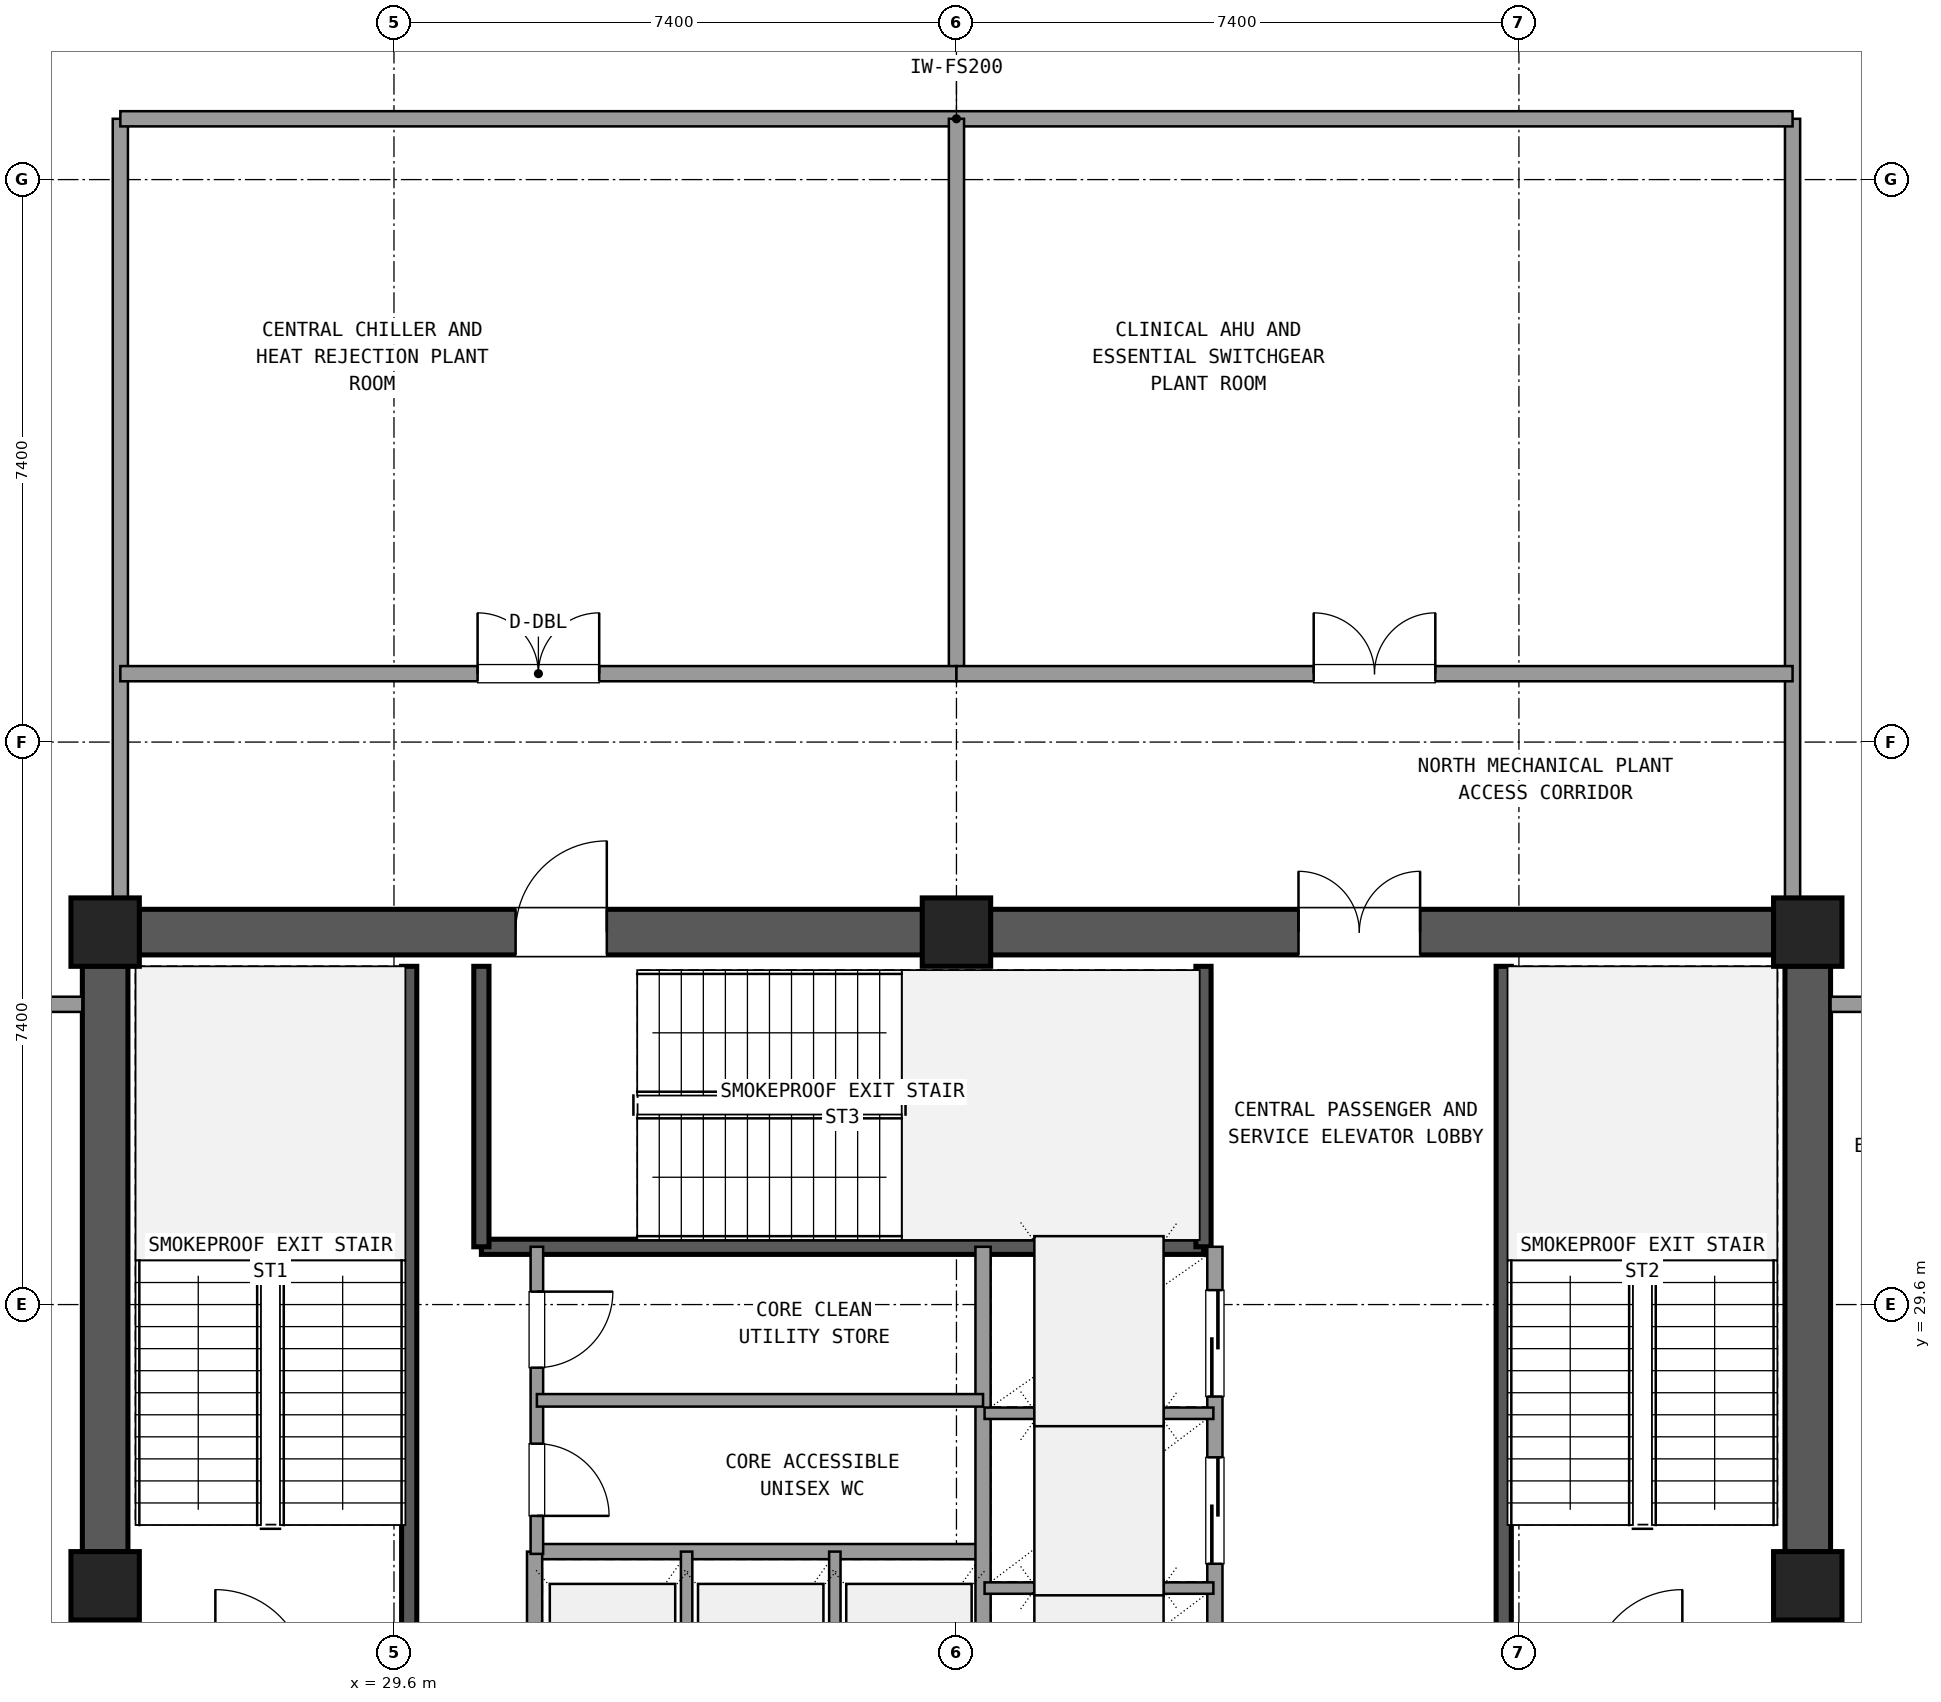
"""IFC4 building model, lengths in metres.
Left out: names, types, materials, properties, quantities, classifications, styles, units other than length and angle.
Written with IfcOpenShell. Run it as: python <this file> out.ifc"""

import sys

from ifc_helpers import new_model, si_unit, direction, frame, frame_2d, origin, origin_2d, place, context, subcontext, project, spatial, rectangle, extrude, element, fill, save


model = new_model("IFC4")
c1 = context("Model", 3, precision=1e-05, world=origin(), true_north=direction((0.0, 1.0)))
c2 = subcontext(c1, "Body", "Model", "MODEL_VIEW")
j1 = project(units=[si_unit("LENGTHUNIT", "METRE"), si_unit("PLANEANGLEUNIT", "RADIAN")], contexts=[c1])
p1 = place(None, origin())
s1 = spatial("IfcSite", under=j1, at=p1, CompositionType="ELEMENT")
p2 = place(p1, origin())
s2 = spatial("IfcBuilding", under=s1, at=p2, CompositionType="ELEMENT")
p3 = place(p2, frame((0.0, 0.0, 232.38)))
s3 = spatial("IfcBuildingStorey", under=s2, at=p3, CompositionType="ELEMENT", Elevation=232.38)
for number, where, z_axis, x_axis in (
    (1, (48.2, 25.9, 0.0), (0.0, 0.0, 1.0), (1.0, 0.0, 0.0)),
    (2, (48.2, 34.5, 0.0), (0.0, 0.0, 1.0), (1.0, 0.0, 0.0)),
    (3, (37.0, 34.5, 0.0), (0.0, 0.0, 1.0), (1.0, 0.0, 0.0)),
    (4, (25.8, 34.5, 0.0), (0.0, 0.0, 1.0), (1.0, 0.0, 0.0)),
    (5, (25.8, 25.9, 0.0), (0.0, 0.0, 1.0), (1.0, 0.0, 0.0)),
):
    element("IfcColumn", number, at=place(p3, frame(where, z_axis=z_axis, x_axis=x_axis)), inside=s3, PredefinedType="COLUMN", context=c2, shape_type="SweptSolid", body=[
        extrude(rectangle(XDim=0.9, YDim=0.9, at=origin_2d()), origin(), (0.0, 0.0, 1.0), 4.68),
    ])
p4 = place(p3, frame((48.2, 17.745, 0.0), z_axis=(0.0, 0.0, 1.0), x_axis=(0.0, 1.0, 0.0)))
e6 = element("IfcWall", 6, at=p4, inside=s3, PredefinedType="SHEAR", context=c2, shape_type="SweptSolid", body=[
    extrude(rectangle(XDim=7.71, YDim=0.6, at=frame_2d((3.855, 0.0))), origin(), (0.0, 0.0, 1.0), 4.38),
])
p5 = place(p4, frame((4.305, 0.0, 0.0)))
e7 = element("IfcOpeningElement", 7, at=p5, cuts=e6, PredefinedType="OPENING", context=c2, shape_type="SweptSolid", body=[
    extrude(rectangle(XDim=1.2, YDim=2.15, at=frame_2d((0.6, 1.075))), frame((0.0, 0.31, 0.0), z_axis=(0.0, -1.0, 0.0), x_axis=(1.0, 0.0, 0.0)), (0.0, 0.0, 1.0), 0.62),
])
p6 = place(p3, frame((48.2, 26.345, 0.0), z_axis=(0.0, 0.0, 1.0), x_axis=(0.0, 1.0, 0.0)))
e8 = element("IfcWall", 8, at=p6, inside=s3, PredefinedType="SHEAR", context=c2, shape_type="SweptSolid", body=[
    extrude(rectangle(XDim=7.71, YDim=0.6, at=frame_2d((3.855, 0.0))), origin(), (0.0, 0.0, 1.0), 4.38),
])
p7 = place(p3, frame((47.755, 34.5, 0.0), z_axis=(0.0, 0.0, 1.0), x_axis=(-1.0, 0.0, 0.0)))
e9 = element("IfcWall", 9, at=p7, inside=s3, PredefinedType="SHEAR", context=c2, shape_type="SweptSolid", body=[
    extrude(rectangle(XDim=10.31, YDim=0.6, at=frame_2d((5.155, 0.0))), origin(), (0.0, 0.0, 1.0), 4.38),
])
p8 = place(p7, frame((4.655, 0.0, 0.0)))
e10 = element("IfcOpeningElement", 10, at=p8, cuts=e9, PredefinedType="OPENING", context=c2, shape_type="SweptSolid", body=[
    extrude(rectangle(XDim=1.6, YDim=2.2, at=frame_2d((0.8, 1.1))), frame((0.0, 0.31, 0.0), z_axis=(0.0, -1.0, 0.0), x_axis=(1.0, 0.0, 0.0)), (0.0, 0.0, 1.0), 0.62),
])
p9 = place(p3, frame((36.555, 34.5, 0.0), z_axis=(0.0, 0.0, 1.0), x_axis=(-1.0, 0.0, 0.0)))
e11 = element("IfcWall", 11, at=p9, inside=s3, PredefinedType="SHEAR", context=c2, shape_type="SweptSolid", body=[
    extrude(rectangle(XDim=10.31, YDim=0.6, at=frame_2d((5.155, 0.0))), origin(), (0.0, 0.0, 1.0), 4.38),
])
p10 = place(p9, frame((4.155, 0.0, 0.0)))
e12 = element("IfcOpeningElement", 12, at=p10, cuts=e11, PredefinedType="OPENING", context=c2, shape_type="SweptSolid", body=[
    extrude(rectangle(XDim=1.2, YDim=2.15, at=frame_2d((0.6, 1.075))), frame((0.0, 0.31, 0.0), z_axis=(0.0, -1.0, 0.0), x_axis=(1.0, 0.0, 0.0)), (0.0, 0.0, 1.0), 0.62),
])
p11 = place(p3, frame((25.8, 34.055, 0.0), z_axis=(0.0, 0.0, 1.0), x_axis=(0.0, -1.0, 0.0)))
e13 = element("IfcWall", 13, at=p11, inside=s3, PredefinedType="SHEAR", context=c2, shape_type="SweptSolid", body=[
    extrude(rectangle(XDim=7.71, YDim=0.6, at=frame_2d((3.855, 0.0))), origin(), (0.0, 0.0, 1.0), 4.38),
])
p12 = place(p3, frame((25.8, 25.455, 0.0), z_axis=(0.0, 0.0, 1.0), x_axis=(0.0, -1.0, 0.0)))
e14 = element("IfcWall", 14, at=p12, inside=s3, PredefinedType="SHEAR", context=c2, shape_type="SweptSolid", body=[
    extrude(rectangle(XDim=7.71, YDim=0.6, at=frame_2d((3.855, 0.0))), origin(), (0.0, 0.0, 1.0), 4.38),
])
p13 = place(p12, frame((2.205, 0.0, 0.0)))
e15 = element("IfcOpeningElement", 15, at=p13, cuts=e14, PredefinedType="OPENING", context=c2, shape_type="SweptSolid", body=[
    extrude(rectangle(XDim=1.2, YDim=2.15, at=frame_2d((0.6, 1.075))), frame((0.0, 0.31, 0.0), z_axis=(0.0, -1.0, 0.0), x_axis=(1.0, 0.0, 0.0)), (0.0, 0.0, 1.0), 0.62),
])
for number, where, z_axis, x_axis in (
    (16, (29.8, 24.65, 0.0), (0.0, 0.0, 1.0), (0.0, 1.0, 0.0)),
    (17, (44.2, 24.65, 0.0), (0.0, 0.0, 1.0), (0.0, 1.0, 0.0)),
):
    element("IfcWall", number, at=place(p3, frame(where, z_axis=z_axis, x_axis=x_axis)), inside=s3, PredefinedType="SHEAR", context=c2, shape_type="SweptSolid", body=[
        extrude(rectangle(XDim=9.4, YDim=0.2, at=frame_2d((4.7, 0.0))), origin(), (0.0, 0.0, 1.0), 4.38),
    ])
p14 = place(p3, frame((30.75, 30.36, 0.0), z_axis=(0.0, 0.0, 1.0), x_axis=(1.0, 0.0, 0.0)))
e18 = element("IfcWall", 18, at=p14, inside=s3, PredefinedType="SHEAR", context=c2, shape_type="SweptSolid", body=[
    extrude(rectangle(XDim=9.5, YDim=0.2, at=frame_2d((4.75, 0.0))), origin(), (0.0, 0.0, 1.0), 4.38),
])
for number, where, z_axis, x_axis in (
    (19, (30.75, 30.36, 0.0), (0.0, 0.0, 1.0), (0.0, 1.0, 0.0)),
    (20, (40.25, 30.36, 0.0), (0.0, 0.0, 1.0), (0.0, 1.0, 0.0)),
):
    element("IfcWall", number, at=place(p3, frame(where, z_axis=z_axis, x_axis=x_axis)), inside=s3, PredefinedType="SHEAR", context=c2, shape_type="SweptSolid", body=[
        extrude(rectangle(XDim=3.69, YDim=0.2, at=frame_2d((1.845, 0.0))), origin(), (0.0, 0.0, 1.0), 4.38),
    ])
p15 = place(p3, frame((31.45, 26.35, 0.0), z_axis=(0.0, 0.0, 1.0), x_axis=(1.0, 0.0, 0.0)))
e21 = element("IfcWall", 21, at=p15, inside=s3, PredefinedType="SOLIDWALL", context=c2, shape_type="SweptSolid", body=[
    extrude(rectangle(XDim=5.9, YDim=0.2, at=frame_2d((2.95, 0.0))), origin(), (0.0, 0.0, 1.0), 2.75),
])
p16 = place(p3, frame((31.45, 23.54, 0.0), z_axis=(0.0, 0.0, 1.0), x_axis=(0.0, 1.0, 0.0)))
e22 = element("IfcWall", 22, at=p16, inside=s3, PredefinedType="SOLIDWALL", context=c2, shape_type="SweptSolid", body=[
    extrude(rectangle(XDim=2.81, YDim=0.2, at=frame_2d((1.405, 0.0))), origin(), (0.0, 0.0, 1.0), 2.75),
])
for number, where, z_axis, x_axis in (
    (23, (33.45, 23.54, 0.0), (0.0, 0.0, 1.0), (0.0, 1.0, 0.0)),
    (24, (35.4, 23.54, 0.0), (0.0, 0.0, 1.0), (0.0, 1.0, 0.0)),
):
    element("IfcWall", number, at=place(p3, frame(where, z_axis=z_axis, x_axis=x_axis)), inside=s3, PredefinedType="PARTITIONING", context=c2, shape_type="SweptSolid", body=[
        extrude(rectangle(XDim=2.81, YDim=0.15, at=frame_2d((1.405, 0.0))), origin(), (0.0, 0.0, 1.0), 2.75),
    ])
p17 = place(p3, frame((37.35, 23.54, 0.0), z_axis=(0.0, 0.0, 1.0), x_axis=(0.0, 1.0, 0.0)))
e25 = element("IfcWall", 25, at=p17, inside=s3, PredefinedType="SOLIDWALL", context=c2, shape_type="SweptSolid", body=[
    extrude(rectangle(XDim=6.82, YDim=0.2, at=frame_2d((3.41, 0.0))), origin(), (0.0, 0.0, 1.0), 2.75),
])
p18 = place(p3, frame((40.4, 23.54, 0.0), z_axis=(0.0, 0.0, 1.0), x_axis=(0.0, 1.0, 0.0)))
e26 = element("IfcWall", 26, at=p18, inside=s3, PredefinedType="SOLIDWALL", context=c2, shape_type="SweptSolid", body=[
    extrude(rectangle(XDim=6.82, YDim=0.2, at=frame_2d((3.41, 0.0))), origin(), (0.0, 0.0, 1.0), 2.75),
])
p19 = place(p18, frame((0.35, 0.0, 0.0)))
e27 = element("IfcOpeningElement", 27, at=p19, cuts=e26, PredefinedType="OPENING", context=c2, shape_type="SweptSolid", body=[
    extrude(rectangle(XDim=1.4, YDim=2.2, at=frame_2d((0.7, 1.1))), frame((0.0, 0.11, 0.0), z_axis=(0.0, -1.0, 0.0), x_axis=(1.0, 0.0, 0.0)), (0.0, 0.0, 1.0), 0.22),
])
p20 = place(p18, frame((2.65, 0.0, 0.0)))
e28 = element("IfcOpeningElement", 28, at=p20, cuts=e26, PredefinedType="OPENING", context=c2, shape_type="SweptSolid", body=[
    extrude(rectangle(XDim=1.4, YDim=2.2, at=frame_2d((0.7, 1.1))), frame((0.0, 0.11, 0.0), z_axis=(0.0, -1.0, 0.0), x_axis=(1.0, 0.0, 0.0)), (0.0, 0.0, 1.0), 0.22),
])
p21 = place(p18, frame((4.85, 0.0, 0.0)))
e29 = element("IfcOpeningElement", 29, at=p21, cuts=e26, PredefinedType="OPENING", context=c2, shape_type="SweptSolid", body=[
    extrude(rectangle(XDim=1.4, YDim=2.2, at=frame_2d((0.7, 1.1))), frame((0.0, 0.11, 0.0), z_axis=(0.0, -1.0, 0.0), x_axis=(1.0, 0.0, 0.0)), (0.0, 0.0, 1.0), 0.22),
])
for number, where, z_axis, x_axis in (
    (30, (37.37, 25.87, 0.0), (0.0, 0.0, 1.0), (1.0, 0.0, 0.0)),
    (31, (37.37, 28.17, 0.0), (0.0, 0.0, 1.0), (1.0, 0.0, 0.0)),
):
    element("IfcWall", number, at=place(p3, frame(where, z_axis=z_axis, x_axis=x_axis)), inside=s3, PredefinedType="PARTITIONING", context=c2, shape_type="SweptSolid", body=[
        extrude(rectangle(XDim=3.01, YDim=0.15, at=frame_2d((1.505, 0.0))), origin(), (0.0, 0.0, 1.0), 2.75),
    ])
p22 = place(p3, frame((31.48, 26.32, 0.0), z_axis=(0.0, 0.0, 1.0), x_axis=(0.0, 1.0, 0.0)))
e32 = element("IfcWall", 32, at=p22, inside=s3, PredefinedType="PLUMBINGWALL", context=c2, shape_type="SweptSolid", body=[
    extrude(rectangle(XDim=4.04, YDim=0.165, at=frame_2d((2.02, 0.0))), origin(), (0.0, 0.0, 1.0), 2.75),
])
p23 = place(p22, frame((0.5, 0.0, 0.0)))
e33 = element("IfcOpeningElement", 33, at=p23, cuts=e32, PredefinedType="OPENING", context=c2, shape_type="SweptSolid", body=[
    extrude(rectangle(XDim=0.95, YDim=2.1, at=frame_2d((0.475, 1.05))), frame((0.0, 0.093, 0.0), z_axis=(0.0, -1.0, 0.0), x_axis=(1.0, 0.0, 0.0)), (0.0, 0.0, 1.0), 0.185),
])
p24 = place(p22, frame((2.45, 0.0, 0.0)))
e34 = element("IfcOpeningElement", 34, at=p24, cuts=e32, PredefinedType="OPENING", context=c2, shape_type="SweptSolid", body=[
    extrude(rectangle(XDim=1.0, YDim=2.15, at=frame_2d((0.5, 1.075))), frame((0.0, 0.093, 0.0), z_axis=(0.0, -1.0, 0.0), x_axis=(1.0, 0.0, 0.0)), (0.0, 0.0, 1.0), 0.185),
])
p25 = place(p3, frame((31.48, 28.34, 0.0), z_axis=(0.0, 0.0, 1.0), x_axis=(1.0, 0.0, 0.0)))
e35 = element("IfcWall", 35, at=p25, inside=s3, PredefinedType="PLUMBINGWALL", context=c2, shape_type="SweptSolid", body=[
    extrude(rectangle(XDim=5.87, YDim=0.165, at=frame_2d((2.935, 0.0))), origin(), (0.0, 0.0, 1.0), 2.75),
])
for number, where, z_axis, x_axis in (
    (36, (26.0, 34.8, 0.0), (0.0, 0.0, 1.0), (0.0, 1.0, 0.0)),
    (37, (48.0, 34.8, 0.0), (0.0, 0.0, 1.0), (0.0, 1.0, 0.0)),
):
    element("IfcWall", number, at=place(p3, frame(where, z_axis=z_axis, x_axis=x_axis)), inside=s3, PredefinedType="SOLIDWALL", context=c2, shape_type="SweptSolid", body=[
        extrude(rectangle(XDim=10.4, YDim=0.2, at=frame_2d((5.2, 0.0))), origin(), (0.0, 0.0, 1.0), 2.75),
    ])
p26 = place(p3, frame((26.0, 45.2, 0.0), z_axis=(0.0, 0.0, 1.0), x_axis=(1.0, 0.0, 0.0)))
e38 = element("IfcWall", 38, at=p26, inside=s3, PredefinedType="SOLIDWALL", context=c2, shape_type="SweptSolid", body=[
    extrude(rectangle(XDim=22.0, YDim=0.2, at=frame_2d((11.0, 0.0))), origin(), (0.0, 0.0, 1.0), 2.75),
])
p27 = place(p3, frame((37.0, 37.9, 0.0), z_axis=(0.0, 0.0, 1.0), x_axis=(0.0, 1.0, 0.0)))
e39 = element("IfcWall", 39, at=p27, inside=s3, PredefinedType="SOLIDWALL", context=c2, shape_type="SweptSolid", body=[
    extrude(rectangle(XDim=7.3, YDim=0.2, at=frame_2d((3.65, 0.0))), origin(), (0.0, 0.0, 1.0), 2.75),
])
p28 = place(p3, frame((26.0, 37.9, 0.0), z_axis=(0.0, 0.0, 1.0), x_axis=(1.0, 0.0, 0.0)))
e40 = element("IfcWall", 40, at=p28, inside=s3, PredefinedType="SOLIDWALL", context=c2, shape_type="SweptSolid", body=[
    extrude(rectangle(XDim=11.0, YDim=0.2, at=frame_2d((5.5, 0.0))), origin(), (0.0, 0.0, 1.0), 2.75),
])
p29 = place(p28, frame((4.7, 0.0, 0.0)))
e41 = element("IfcOpeningElement", 41, at=p29, cuts=e40, PredefinedType="OPENING", context=c2, shape_type="SweptSolid", body=[
    extrude(rectangle(XDim=1.6, YDim=2.2, at=frame_2d((0.8, 1.1))), frame((0.0, 0.11, 0.0), z_axis=(0.0, -1.0, 0.0), x_axis=(1.0, 0.0, 0.0)), (0.0, 0.0, 1.0), 0.22),
])
p30 = place(p3, frame((37.0, 37.9, 0.0), z_axis=(0.0, 0.0, 1.0), x_axis=(1.0, 0.0, 0.0)))
e42 = element("IfcWall", 42, at=p30, inside=s3, PredefinedType="SOLIDWALL", context=c2, shape_type="SweptSolid", body=[
    extrude(rectangle(XDim=11.0, YDim=0.2, at=frame_2d((5.5, 0.0))), origin(), (0.0, 0.0, 1.0), 2.75),
])
p31 = place(p30, frame((4.7, 0.0, 0.0)))
e43 = element("IfcOpeningElement", 43, at=p31, cuts=e42, PredefinedType="OPENING", context=c2, shape_type="SweptSolid", body=[
    extrude(rectangle(XDim=1.6, YDim=2.2, at=frame_2d((0.8, 1.1))), frame((0.0, 0.11, 0.0), z_axis=(0.0, -1.0, 0.0), x_axis=(1.0, 0.0, 0.0)), (0.0, 0.0, 1.0), 0.22),
])
for number, where, z_axis, x_axis in (
    (44, (15.0, 33.55, 0.0), (0.0, 0.0, 1.0), (1.0, 0.0, 0.0)),
    (45, (48.5, 33.55, 0.0), (0.0, 0.0, 1.0), (1.0, 0.0, 0.0)),
):
    element("IfcWall", number, at=place(p3, frame(where, z_axis=z_axis, x_axis=x_axis)), inside=s3, PredefinedType="SOLIDWALL", context=c2, shape_type="SweptSolid", body=[
        extrude(rectangle(XDim=10.5, YDim=0.2, at=frame_2d((5.25, 0.0))), origin(), (0.0, 0.0, 1.0), 2.75),
    ])
p32 = place(p8, frame((1.6, 0.0, 0.0), z_axis=(0.0, 0.0, 1.0), x_axis=(-1.0, 0.0, 0.0)))
e46 = element("IfcDoor", 46, at=p32, inside=s3, OperationType="DOUBLE_DOOR_SINGLE_SWING", PredefinedType="DOOR", context=c2, shape_type="SweptSolid", body=[
    extrude(rectangle(XDim=1.6, YDim=2.2, at=frame_2d((0.8, 1.1))), frame((0.0, 0.025, 0.0), z_axis=(0.0, -1.0, 0.0), x_axis=(1.0, 0.0, 0.0)), (0.0, 0.0, 1.0), 0.05),
])
fill(e10, e46)
p33 = place(p10, frame((1.2, 0.0, 0.0), z_axis=(0.0, 0.0, 1.0), x_axis=(-1.0, 0.0, 0.0)))
e47 = element("IfcDoor", 47, at=p33, inside=s3, OperationType="SINGLE_SWING_LEFT", PredefinedType="DOOR", context=c2, shape_type="SweptSolid", body=[
    extrude(rectangle(XDim=1.2, YDim=2.15, at=frame_2d((0.6, 1.075))), frame((0.0, 0.025, 0.0), z_axis=(0.0, -1.0, 0.0), x_axis=(1.0, 0.0, 0.0)), (0.0, 0.0, 1.0), 0.05),
])
fill(e12, e47)
p34 = place(p20, origin())
e48 = element("IfcDoor", 48, at=p34, inside=s3, OperationType="SLIDING_TO_LEFT", PredefinedType="DOOR", context=c2, shape_type="SweptSolid", body=[
    extrude(rectangle(XDim=1.4, YDim=2.2, at=frame_2d((0.7, 1.1))), frame((0.0, 0.025, 0.0), z_axis=(0.0, -1.0, 0.0), x_axis=(1.0, 0.0, 0.0)), (0.0, 0.0, 1.0), 0.05),
])
fill(e28, e48)
p35 = place(p21, origin())
e49 = element("IfcDoor", 49, at=p35, inside=s3, OperationType="SLIDING_TO_RIGHT", PredefinedType="DOOR", context=c2, shape_type="SweptSolid", body=[
    extrude(rectangle(XDim=1.4, YDim=2.2, at=frame_2d((0.7, 1.1))), frame((0.0, 0.025, 0.0), z_axis=(0.0, -1.0, 0.0), x_axis=(1.0, 0.0, 0.0)), (0.0, 0.0, 1.0), 0.05),
])
fill(e29, e49)
p36 = place(p23, frame((0.95, 0.0, 0.0), z_axis=(0.0, 0.0, 1.0), x_axis=(-1.0, 0.0, 0.0)))
e50 = element("IfcDoor", 50, at=p36, inside=s3, OperationType="SINGLE_SWING_LEFT", PredefinedType="DOOR", context=c2, shape_type="SweptSolid", body=[
    extrude(rectangle(XDim=0.95, YDim=2.1, at=frame_2d((0.475, 1.05))), frame((0.0, 0.025, 0.0), z_axis=(0.0, -1.0, 0.0), x_axis=(1.0, 0.0, 0.0)), (0.0, 0.0, 1.0), 0.05),
])
fill(e33, e50)
p37 = place(p24, frame((1.0, 0.0, 0.0), z_axis=(0.0, 0.0, 1.0), x_axis=(-1.0, 0.0, 0.0)))
e51 = element("IfcDoor", 51, at=p37, inside=s3, OperationType="SINGLE_SWING_RIGHT", PredefinedType="DOOR", context=c2, shape_type="SweptSolid", body=[
    extrude(rectangle(XDim=1.0, YDim=2.15, at=frame_2d((0.5, 1.075))), frame((0.0, 0.025, 0.0), z_axis=(0.0, -1.0, 0.0), x_axis=(1.0, 0.0, 0.0)), (0.0, 0.0, 1.0), 0.05),
])
fill(e34, e51)
p38 = place(p29, origin())
e52 = element("IfcDoor", 52, at=p38, inside=s3, OperationType="DOUBLE_DOOR_SINGLE_SWING", PredefinedType="DOOR", context=c2, shape_type="SweptSolid", body=[
    extrude(rectangle(XDim=1.6, YDim=2.2, at=frame_2d((0.8, 1.1))), frame((0.0, 0.025, 0.0), z_axis=(0.0, -1.0, 0.0), x_axis=(1.0, 0.0, 0.0)), (0.0, 0.0, 1.0), 0.05),
])
fill(e41, e52)
p39 = place(p31, origin())
e53 = element("IfcDoor", 53, at=p39, inside=s3, OperationType="DOUBLE_DOOR_SINGLE_SWING", PredefinedType="DOOR", context=c2, shape_type="SweptSolid", body=[
    extrude(rectangle(XDim=1.6, YDim=2.2, at=frame_2d((0.8, 1.1))), frame((0.0, 0.025, 0.0), z_axis=(0.0, -1.0, 0.0), x_axis=(1.0, 0.0, 0.0)), (0.0, 0.0, 1.0), 0.05),
])
fill(e43, e53)
save(model, sys.argv[1])
